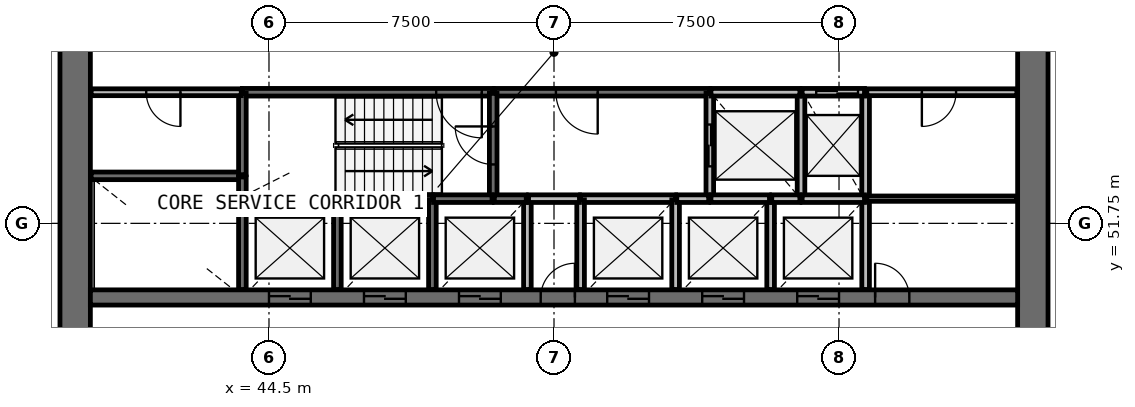
"""IFC4 building model, lengths in metres.
Left out: names, types, materials, properties, quantities, classifications, styles, units other than length and angle.
Written with IfcOpenShell. Run it as: python <this file> out.ifc"""

import sys

from ifc_helpers import new_model, si_unit, direction, frame, frame_2d, origin, place, context, subcontext, project, spatial, rectangle, extrude, source, transform, mapped, element, fill, save


model = new_model("IFC4")
c1 = context("Model", 3, precision=1e-05, world=origin(), true_north=direction((0.0, 1.0)))
c2 = subcontext(c1, "Body", "Model", "MODEL_VIEW")
j1 = project(units=[si_unit("LENGTHUNIT", "METRE"), si_unit("PLANEANGLEUNIT", "RADIAN")], contexts=[c1])
p1 = place(None, origin())
s1 = spatial("IfcSite", under=j1, at=p1, CompositionType="ELEMENT")
p2 = place(p1, origin())
s2 = spatial("IfcBuilding", under=s1, at=p2, CompositionType="ELEMENT")
p3 = place(p2, frame((0.0, 0.0, 133.1)))
s3 = spatial("IfcBuildingStorey", under=s2, at=p3, CompositionType="ELEMENT", Elevation=133.1)
p4 = place(p3, frame((64.6, 38.0, 0.0), z_axis=(0.0, 0.0, 1.0), x_axis=(0.0, 1.0, 0.0)))
e1 = element("IfcWall", 1, at=p4, inside=s3, PredefinedType="SHEAR", context=c2, shape_type="SweptSolid", body=[
    extrude(rectangle(XDim=20.0, YDim=0.8, at=frame_2d((10.0, 0.0))), origin(), (0.0, 0.0, 1.0), 3.9),
])
p5 = place(p4, frame((9.1, 0.0, 0.0)))
e2 = element("IfcOpeningElement", 2, at=p5, cuts=e1, PredefinedType="OPENING", context=c2, shape_type="SweptSolid", body=[
    extrude(rectangle(XDim=1.8, YDim=2.1, at=frame_2d((0.9, 1.05))), frame((0.0, 0.41, 0.0), z_axis=(0.0, -1.0, 0.0), x_axis=(1.0, 0.0, 0.0)), (0.0, 0.0, 1.0), 0.82),
])
p6 = place(p3, frame((39.4, 58.0, 0.0), z_axis=(0.0, 0.0, 1.0), x_axis=(0.0, -1.0, 0.0)))
e3 = element("IfcWall", 3, at=p6, inside=s3, PredefinedType="SHEAR", context=c2, shape_type="SweptSolid", body=[
    extrude(rectangle(XDim=20.0, YDim=0.8, at=frame_2d((10.0, 0.0))), origin(), (0.0, 0.0, 1.0), 3.9),
])
p7 = place(p6, frame((9.1, 0.0, 0.0)))
e4 = element("IfcOpeningElement", 4, at=p7, cuts=e3, PredefinedType="OPENING", context=c2, shape_type="SweptSolid", body=[
    extrude(rectangle(XDim=1.8, YDim=2.1, at=frame_2d((0.9, 1.05))), frame((0.0, 0.41, 0.0), z_axis=(0.0, -1.0, 0.0), x_axis=(1.0, 0.0, 0.0)), (0.0, 0.0, 1.0), 0.82),
])
p8 = place(p3, frame((39.8, 49.8, 0.0), z_axis=(0.0, 0.0, 1.0), x_axis=(1.0, 0.0, 0.0)))
e5 = element("IfcWall", 5, at=p8, inside=s3, PredefinedType="SHEAR", context=c2, shape_type="SweptSolid", body=[
    extrude(rectangle(XDim=24.4, YDim=0.4, at=frame_2d((12.2, 0.0))), origin(), (0.0, 0.0, 1.0), 3.9),
])
p9 = place(p8, frame((13.6, 0.0, 0.0)))
e6 = element("IfcOpeningElement", 6, at=p9, cuts=e5, PredefinedType="OPENING", context=c2, shape_type="SweptSolid", body=[
    extrude(rectangle(XDim=1.1, YDim=2.1, at=frame_2d((0.55, 1.05))), frame((0.0, 0.21, 0.0), z_axis=(0.0, -1.0, 0.0), x_axis=(1.0, 0.0, 0.0)), (0.0, 0.0, 1.0), 0.42),
])
p10 = place(p8, frame((16.1, 0.0, 0.0)))
e7 = element("IfcOpeningElement", 7, at=p10, cuts=e5, PredefinedType="OPENING", context=c2, shape_type="SweptSolid", body=[
    extrude(rectangle(XDim=1.1, YDim=2.1, at=frame_2d((0.55, 1.05))), frame((0.0, 0.21, 0.0), z_axis=(0.0, -1.0, 0.0), x_axis=(1.0, 0.0, 0.0)), (0.0, 0.0, 1.0), 0.42),
])
p11 = place(p8, frame((18.6, 0.0, 0.0)))
e8 = element("IfcOpeningElement", 8, at=p11, cuts=e5, PredefinedType="OPENING", context=c2, shape_type="SweptSolid", body=[
    extrude(rectangle(XDim=1.1, YDim=2.1, at=frame_2d((0.55, 1.05))), frame((0.0, 0.21, 0.0), z_axis=(0.0, -1.0, 0.0), x_axis=(1.0, 0.0, 0.0)), (0.0, 0.0, 1.0), 0.42),
])
p12 = place(p8, frame((4.7, 0.0, 0.0)))
e9 = element("IfcOpeningElement", 9, at=p12, cuts=e5, PredefinedType="OPENING", context=c2, shape_type="SweptSolid", body=[
    extrude(rectangle(XDim=1.1, YDim=2.1, at=frame_2d((0.55, 1.05))), frame((0.0, 0.21, 0.0), z_axis=(0.0, -1.0, 0.0), x_axis=(1.0, 0.0, 0.0)), (0.0, 0.0, 1.0), 0.42),
])
p13 = place(p8, frame((7.2, 0.0, 0.0)))
e10 = element("IfcOpeningElement", 10, at=p13, cuts=e5, PredefinedType="OPENING", context=c2, shape_type="SweptSolid", body=[
    extrude(rectangle(XDim=1.1, YDim=2.1, at=frame_2d((0.55, 1.05))), frame((0.0, 0.21, 0.0), z_axis=(0.0, -1.0, 0.0), x_axis=(1.0, 0.0, 0.0)), (0.0, 0.0, 1.0), 0.42),
])
p14 = place(p8, frame((9.7, 0.0, 0.0)))
e11 = element("IfcOpeningElement", 11, at=p14, cuts=e5, PredefinedType="OPENING", context=c2, shape_type="SweptSolid", body=[
    extrude(rectangle(XDim=1.1, YDim=2.1, at=frame_2d((0.55, 1.05))), frame((0.0, 0.21, 0.0), z_axis=(0.0, -1.0, 0.0), x_axis=(1.0, 0.0, 0.0)), (0.0, 0.0, 1.0), 0.42),
])
p15 = place(p8, frame((20.65, 0.0, 0.0)))
e12 = element("IfcOpeningElement", 12, at=p15, cuts=e5, PredefinedType="OPENING", context=c2, shape_type="SweptSolid", body=[
    extrude(rectangle(XDim=0.9, YDim=2.1, at=frame_2d((0.45, 1.05))), frame((0.0, 0.21, 0.0), z_axis=(0.0, -1.0, 0.0), x_axis=(1.0, 0.0, 0.0)), (0.0, 0.0, 1.0), 0.42),
])
p16 = place(p8, frame((11.85, 0.0, 0.0)))
e13 = element("IfcOpeningElement", 13, at=p16, cuts=e5, PredefinedType="OPENING", context=c2, shape_type="SweptSolid", body=[
    extrude(rectangle(XDim=0.9, YDim=2.1, at=frame_2d((0.45, 1.05))), frame((0.0, 0.21, 0.0), z_axis=(0.0, -1.0, 0.0), x_axis=(1.0, 0.0, 0.0)), (0.0, 0.0, 1.0), 0.42),
])
p17 = place(p3, frame((50.4, 55.2, 0.0), z_axis=(0.0, 0.0, 1.0), x_axis=(-1.0, 0.0, 0.0)))
e14 = element("IfcWall", 14, at=p17, inside=s3, PredefinedType="SOLIDWALL", context=c2, shape_type="SweptSolid", body=[
    extrude(rectangle(XDim=6.6, YDim=0.2, at=frame_2d((3.3, 0.0))), origin(), (0.0, 0.0, 1.0), 3.58),
])
p18 = place(p17, frame((0.3, 0.0, 0.0)))
e15 = element("IfcOpeningElement", 15, at=p18, cuts=e14, PredefinedType="OPENING", context=c2, shape_type="SweptSolid", body=[
    extrude(rectangle(XDim=1.2, YDim=2.1, at=frame_2d((0.6, 1.05))), frame((0.0, 0.11, 0.0), z_axis=(0.0, -1.0, 0.0), x_axis=(1.0, 0.0, 0.0)), (0.0, 0.0, 1.0), 0.22),
])
p19 = place(p3, frame((56.1, 55.2, 0.0), z_axis=(0.0, 0.0, 1.0), x_axis=(-1.0, 0.0, 0.0)))
e16 = element("IfcWall", 16, at=p19, inside=s3, PredefinedType="SOLIDWALL", context=c2, shape_type="SweptSolid", body=[
    extrude(rectangle(XDim=5.67, YDim=0.2, at=frame_2d((2.835, 0.0))), origin(), (0.0, 0.0, 1.0), 3.58),
])
p20 = place(p19, frame((2.95, 0.0, 0.0)))
e17 = element("IfcOpeningElement", 17, at=p20, cuts=e16, PredefinedType="OPENING", context=c2, shape_type="SweptSolid", body=[
    extrude(rectangle(XDim=1.1, YDim=2.1, at=frame_2d((0.55, 1.05))), frame((0.0, 0.11, 0.0), z_axis=(0.0, -1.0, 0.0), x_axis=(1.0, 0.0, 0.0)), (0.0, 0.0, 1.0), 0.22),
])
p21 = place(p3, frame((43.8, 53.0, 0.0), z_axis=(0.0, 0.0, 1.0), x_axis=(-1.0, 0.0, 0.0)))
e18 = element("IfcWall", 18, at=p21, inside=s3, PredefinedType="SOLIDWALL", context=c2, shape_type="SweptSolid", body=[
    extrude(rectangle(XDim=3.98, YDim=0.2, at=frame_2d((1.99, 0.0))), origin(), (0.0, 0.0, 1.0), 3.58),
])
p22 = place(p3, frame((50.4, 52.4, 0.0), z_axis=(0.0, 0.0, 1.0), x_axis=(0.0, 1.0, 0.0)))
e19 = element("IfcWall", 19, at=p22, inside=s3, PredefinedType="SOLIDWALL", context=c2, shape_type="SweptSolid", body=[
    extrude(rectangle(XDim=2.77, YDim=0.2, at=frame_2d((1.385, 0.0))), origin(), (0.0, 0.0, 1.0), 3.58),
])
p23 = place(p22, frame((0.9, 0.0, 0.0)))
e20 = element("IfcOpeningElement", 20, at=p23, cuts=e19, PredefinedType="OPENING", context=c2, shape_type="SweptSolid", body=[
    extrude(rectangle(XDim=1.0, YDim=2.1, at=frame_2d((0.5, 1.05))), frame((0.0, 0.11, 0.0), z_axis=(0.0, -1.0, 0.0), x_axis=(1.0, 0.0, 0.0)), (0.0, 0.0, 1.0), 0.22),
])
p24 = place(p3, frame((56.1, 55.17, 0.0), z_axis=(0.0, 0.0, 1.0), x_axis=(0.0, -1.0, 0.0)))
e21 = element("IfcWall", 21, at=p24, inside=s3, PredefinedType="SOLIDWALL", context=c2, shape_type="SweptSolid", body=[
    extrude(rectangle(XDim=2.77, YDim=0.2, at=frame_2d((1.385, 0.0))), origin(), (0.0, 0.0, 1.0), 3.58),
])
p25 = place(p24, frame((0.82, 0.0, 0.0)))
e22 = element("IfcOpeningElement", 22, at=p25, cuts=e21, PredefinedType="OPENING", context=c2, shape_type="SweptSolid", body=[
    extrude(rectangle(XDim=1.1, YDim=2.1, at=frame_2d((0.55, 1.05))), frame((0.0, 0.11, 0.0), z_axis=(0.0, -1.0, 0.0), x_axis=(1.0, 0.0, 0.0)), (0.0, 0.0, 1.0), 0.22),
])
for number, where, z_axis, x_axis in (
    (23, (58.5, 52.4, 0.0), (0.0, 0.0, 1.0), (0.0, 1.0, 0.0)),
    (24, (60.2, 52.4, 0.0), (0.0, 0.0, 1.0), (0.0, 1.0, 0.0)),
):
    element("IfcWall", number, at=place(p3, frame(where, z_axis=z_axis, x_axis=x_axis)), inside=s3, PredefinedType="SOLIDWALL", context=c2, shape_type="SweptSolid", body=[
        extrude(rectangle(XDim=2.8, YDim=0.2, at=frame_2d((1.4, 0.0))), origin(), (0.0, 0.0, 1.0), 3.58),
    ])
p26 = place(p3, frame((46.3, 52.4, 0.0), z_axis=(0.0, 0.0, 1.0), x_axis=(-1.0, 0.0, 0.0)))
e25 = element("IfcWall", 25, at=p26, inside=s3, PredefinedType="SOLIDWALL", context=c2, shape_type="SweptSolid", body=[
    extrude(rectangle(XDim=2.5, YDim=0.2, at=frame_2d((1.25, 0.0))), origin(), (0.0, 0.0, 1.0), 3.58),
])
p27 = place(p3, frame((48.8, 52.4, 0.0), z_axis=(0.0, 0.0, 1.0), x_axis=(-1.0, 0.0, 0.0)))
e26 = element("IfcWall", 26, at=p27, inside=s3, PredefinedType="SOLIDWALL", context=c2, shape_type="SweptSolid", body=[
    extrude(rectangle(XDim=2.47, YDim=0.2, at=frame_2d((1.235, 0.0))), origin(), (0.0, 0.0, 1.0), 3.58),
])
p28 = place(p3, frame((55.2, 52.4, 0.0), z_axis=(0.0, 0.0, 1.0), x_axis=(-1.0, 0.0, 0.0)))
e27 = element("IfcWall", 27, at=p28, inside=s3, PredefinedType="SOLIDWALL", context=c2, shape_type="SweptSolid", body=[
    extrude(rectangle(XDim=2.5, YDim=0.2, at=frame_2d((1.25, 0.0))), origin(), (0.0, 0.0, 1.0), 3.58),
])
p29 = place(p3, frame((58.47, 55.2, 0.0), z_axis=(0.0, 0.0, 1.0), x_axis=(-1.0, 0.0, 0.0)))
e28 = element("IfcWall", 28, at=p29, inside=s3, PredefinedType="SOLIDWALL", context=c2, shape_type="SweptSolid", body=[
    extrude(rectangle(XDim=2.34, YDim=0.2, at=frame_2d((1.17, 0.0))), origin(), (0.0, 0.0, 1.0), 3.58),
])
for number, where, z_axis, x_axis in (
    (29, (43.8, 52.37, 0.0), (0.0, 0.0, 1.0), (0.0, -1.0, 0.0)),
    (30, (46.3, 50.01, 0.0), (0.0, 0.0, 1.0), (0.0, 1.0, 0.0)),
    (31, (48.8, 50.01, 0.0), (0.0, 0.0, 1.0), (0.0, 1.0, 0.0)),
):
    element("IfcWall", number, at=place(p3, frame(where, z_axis=z_axis, x_axis=x_axis)), inside=s3, PredefinedType="SOLIDWALL", context=c2, shape_type="SweptSolid", body=[
        extrude(rectangle(XDim=2.36, YDim=0.2, at=frame_2d((1.18, 0.0))), origin(), (0.0, 0.0, 1.0), 3.58),
    ])
p30 = place(p3, frame((51.3, 50.01, 0.0), z_axis=(0.0, 0.0, 1.0), x_axis=(0.0, 1.0, 0.0)))
e32 = element("IfcWall", 32, at=p30, inside=s3, PredefinedType="SOLIDWALL", context=c2, shape_type="SweptSolid", body=[
    extrude(rectangle(XDim=2.39, YDim=0.2, at=frame_2d((1.195, 0.0))), origin(), (0.0, 0.0, 1.0), 3.58),
])
for number, where, z_axis, x_axis in (
    (33, (52.7, 52.37, 0.0), (0.0, 0.0, 1.0), (0.0, -1.0, 0.0)),
    (34, (55.2, 50.01, 0.0), (0.0, 0.0, 1.0), (0.0, 1.0, 0.0)),
):
    element("IfcWall", number, at=place(p3, frame(where, z_axis=z_axis, x_axis=x_axis)), inside=s3, PredefinedType="SOLIDWALL", context=c2, shape_type="SweptSolid", body=[
        extrude(rectangle(XDim=2.36, YDim=0.2, at=frame_2d((1.18, 0.0))), origin(), (0.0, 0.0, 1.0), 3.58),
    ])
p31 = place(p3, frame((57.7, 50.01, 0.0), z_axis=(0.0, 0.0, 1.0), x_axis=(0.0, 1.0, 0.0)))
e35 = element("IfcWall", 35, at=p31, inside=s3, PredefinedType="SOLIDWALL", context=c2, shape_type="SweptSolid", body=[
    extrude(rectangle(XDim=2.39, YDim=0.2, at=frame_2d((1.195, 0.0))), origin(), (0.0, 0.0, 1.0), 3.58),
])
p32 = place(p3, frame((60.2, 50.01, 0.0), z_axis=(0.0, 0.0, 1.0), x_axis=(0.0, 1.0, 0.0)))
e36 = element("IfcWall", 36, at=p32, inside=s3, PredefinedType="SOLIDWALL", context=c2, shape_type="SweptSolid", body=[
    extrude(rectangle(XDim=2.36, YDim=0.2, at=frame_2d((1.18, 0.0))), origin(), (0.0, 0.0, 1.0), 3.58),
])
p33 = place(p3, frame((43.8, 55.17, 0.0), z_axis=(0.0, 0.0, 1.0), x_axis=(0.0, -1.0, 0.0)))
e37 = element("IfcWall", 37, at=p33, inside=s3, PredefinedType="SOLIDWALL", context=c2, shape_type="SweptSolid", body=[
    extrude(rectangle(XDim=2.14, YDim=0.2, at=frame_2d((1.07, 0.0))), origin(), (0.0, 0.0, 1.0), 3.58),
])
p34 = place(p3, frame((60.17, 52.4, 0.0), z_axis=(0.0, 0.0, 1.0), x_axis=(-1.0, 0.0, 0.0)))
e38 = element("IfcWall", 38, at=p34, inside=s3, PredefinedType="SOLIDWALL", context=c2, shape_type="SweptSolid", body=[
    extrude(rectangle(XDim=1.64, YDim=0.2, at=frame_2d((0.82, 0.0))), origin(), (0.0, 0.0, 1.0), 3.58),
])
p35 = place(p3, frame((60.17, 55.2, 0.0), z_axis=(0.0, 0.0, 1.0), x_axis=(-1.0, 0.0, 0.0)))
e39 = element("IfcWall", 39, at=p35, inside=s3, PredefinedType="SOLIDWALL", context=c2, shape_type="SweptSolid", body=[
    extrude(rectangle(XDim=1.64, YDim=0.2, at=frame_2d((0.82, 0.0))), origin(), (0.0, 0.0, 1.0), 3.58),
])
p36 = place(p35, frame((0.17, 0.0, 0.0)))
e40 = element("IfcOpeningElement", 40, at=p36, cuts=e39, PredefinedType="OPENING", context=c2, shape_type="SweptSolid", body=[
    extrude(rectangle(XDim=1.1, YDim=2.1, at=frame_2d((0.55, 1.05))), frame((0.0, 0.11, 0.0), z_axis=(0.0, -1.0, 0.0), x_axis=(1.0, 0.0, 0.0)), (0.0, 0.0, 1.0), 0.22),
])
for number, where, z_axis, x_axis in (
    (41, (50.37, 52.4, 0.0), (0.0, 0.0, 1.0), (-1.0, 0.0, 0.0)),
    (42, (57.67, 52.4, 0.0), (0.0, 0.0, 1.0), (-1.0, 0.0, 0.0)),
):
    element("IfcWall", number, at=place(p3, frame(where, z_axis=z_axis, x_axis=x_axis)), inside=s3, PredefinedType="SOLIDWALL", context=c2, shape_type="SweptSolid", body=[
        extrude(rectangle(XDim=1.54, YDim=0.2, at=frame_2d((0.77, 0.0))), origin(), (0.0, 0.0, 1.0), 3.58),
    ])
p37 = place(p3, frame((51.33, 52.4, 0.0), z_axis=(0.0, 0.0, 1.0), x_axis=(1.0, 0.0, 0.0)))
e43 = element("IfcWall", 43, at=p37, inside=s3, PredefinedType="SOLIDWALL", context=c2, shape_type="SweptSolid", body=[
    extrude(rectangle(XDim=1.34, YDim=0.2, at=frame_2d((0.67, 0.0))), origin(), (0.0, 0.0, 1.0), 3.58),
])
for number, where, z_axis, x_axis in (
    (44, (51.27, 52.4, 0.0), (0.0, 0.0, 1.0), (-1.0, 0.0, 0.0)),
    (45, (56.07, 52.4, 0.0), (0.0, 0.0, 1.0), (-1.0, 0.0, 0.0)),
):
    element("IfcWall", number, at=place(p3, frame(where, z_axis=z_axis, x_axis=x_axis)), inside=s3, PredefinedType="SOLIDWALL", context=c2, shape_type="SweptSolid", body=[
        extrude(rectangle(XDim=0.84, YDim=0.2, at=frame_2d((0.42, 0.0))), origin(), (0.0, 0.0, 1.0), 3.58),
    ])
p38 = place(p3, frame((58.47, 52.4, 0.0), z_axis=(0.0, 0.0, 1.0), x_axis=(-1.0, 0.0, 0.0)))
e46 = element("IfcWall", 46, at=p38, inside=s3, PredefinedType="SOLIDWALL", context=c2, shape_type="SweptSolid", body=[
    extrude(rectangle(XDim=0.74, YDim=0.2, at=frame_2d((0.37, 0.0))), origin(), (0.0, 0.0, 1.0), 3.58),
])
p39 = place(p3, frame((43.8, 52.43, 0.0), z_axis=(0.0, 0.0, 1.0), x_axis=(0.0, 1.0, 0.0)))
e47 = element("IfcWall", 47, at=p39, inside=s3, PredefinedType="SOLIDWALL", context=c2, shape_type="SweptSolid", body=[
    extrude(rectangle(XDim=0.54, YDim=0.2, at=frame_2d((0.27, 0.0))), origin(), (0.0, 0.0, 1.0), 3.58),
])
p40 = place(p3, frame((64.18, 55.2, 0.0), z_axis=(0.0, 0.0, 1.0), x_axis=(-1.0, 0.0, 0.0)))
e48 = element("IfcWall", 48, at=p40, inside=s3, PredefinedType="PARTITIONING", context=c2, shape_type="SweptSolid", body=[
    extrude(rectangle(XDim=3.95, YDim=0.18, at=frame_2d((1.975, 0.0))), origin(), (0.0, 0.0, 1.0), 3.58),
])
p41 = place(p40, frame((1.6, 0.0, 0.0)))
e49 = element("IfcOpeningElement", 49, at=p41, cuts=e48, PredefinedType="OPENING", context=c2, shape_type="SweptSolid", body=[
    extrude(rectangle(XDim=0.9, YDim=2.1, at=frame_2d((0.45, 1.05))), frame((0.0, 0.1, 0.0), z_axis=(0.0, -1.0, 0.0), x_axis=(1.0, 0.0, 0.0)), (0.0, 0.0, 1.0), 0.2),
])
p42 = place(p3, frame((43.77, 55.2, 0.0), z_axis=(0.0, 0.0, 1.0), x_axis=(-1.0, 0.0, 0.0)))
e50 = element("IfcWall", 50, at=p42, inside=s3, PredefinedType="PARTITIONING", context=c2, shape_type="SweptSolid", body=[
    extrude(rectangle(XDim=3.95, YDim=0.18, at=frame_2d((1.975, 0.0))), origin(), (0.0, 0.0, 1.0), 3.58),
])
p43 = place(p42, frame((1.6, 0.0, 0.0)))
e51 = element("IfcOpeningElement", 51, at=p43, cuts=e50, PredefinedType="OPENING", context=c2, shape_type="SweptSolid", body=[
    extrude(rectangle(XDim=0.9, YDim=2.1, at=frame_2d((0.45, 1.05))), frame((0.0, 0.1, 0.0), z_axis=(0.0, -1.0, 0.0), x_axis=(1.0, 0.0, 0.0)), (0.0, 0.0, 1.0), 0.2),
])
p44 = place(p3, frame((64.18, 52.4, 0.0), z_axis=(0.0, 0.0, 1.0), x_axis=(-1.0, 0.0, 0.0)))
e52 = element("IfcWall", 52, at=p44, inside=s3, PredefinedType="PARTITIONING", context=c2, shape_type="SweptSolid", body=[
    extrude(rectangle(XDim=3.95, YDim=0.14, at=frame_2d((1.975, 0.0))), origin(), (0.0, 0.0, 1.0), 2.88),
])
m1 = source(origin(), c2, "Body", "SweptSolid", [
    extrude(rectangle(XDim=1.1, YDim=2.1, at=frame_2d((0.55, 1.05))), frame((0.0, 0.025, 0.0), z_axis=(0.0, -1.0, 0.0), x_axis=(1.0, 0.0, 0.0)), (0.0, 0.0, 1.0), 0.05),
])
p45 = place(p9, origin())
e53 = element("IfcDoor", 53, at=p45, inside=s3, OperationType="DOUBLE_DOOR_SLIDING", PredefinedType="USERDEFINED", context=c2, shape_type="MappedRepresentation", body=[
    mapped(m1, transform((0.0, 0.0, 0.0), scale=1.0)),
])
fill(e6, e53)
p46 = place(p10, origin())
e54 = element("IfcDoor", 54, at=p46, inside=s3, OperationType="DOUBLE_DOOR_SLIDING", PredefinedType="USERDEFINED", context=c2, shape_type="MappedRepresentation", body=[
    mapped(m1, transform((0.0, 0.0, 0.0), scale=1.0)),
])
fill(e7, e54)
p47 = place(p11, origin())
e55 = element("IfcDoor", 55, at=p47, inside=s3, OperationType="DOUBLE_DOOR_SLIDING", PredefinedType="USERDEFINED", context=c2, shape_type="MappedRepresentation", body=[
    mapped(m1, transform((0.0, 0.0, 0.0), scale=1.0)),
])
fill(e8, e55)
p48 = place(p12, origin())
e56 = element("IfcDoor", 56, at=p48, inside=s3, OperationType="DOUBLE_DOOR_SLIDING", PredefinedType="USERDEFINED", context=c2, shape_type="MappedRepresentation", body=[
    mapped(m1, transform((0.0, 0.0, 0.0), scale=1.0)),
])
fill(e9, e56)
p49 = place(p13, origin())
e57 = element("IfcDoor", 57, at=p49, inside=s3, OperationType="DOUBLE_DOOR_SLIDING", PredefinedType="USERDEFINED", context=c2, shape_type="MappedRepresentation", body=[
    mapped(m1, transform((0.0, 0.0, 0.0), scale=1.0)),
])
fill(e10, e57)
p50 = place(p14, origin())
e58 = element("IfcDoor", 58, at=p50, inside=s3, OperationType="DOUBLE_DOOR_SLIDING", PredefinedType="USERDEFINED", context=c2, shape_type="MappedRepresentation", body=[
    mapped(m1, transform((0.0, 0.0, 0.0), scale=1.0)),
])
fill(e11, e58)
p51 = place(p25, origin())
e59 = element("IfcDoor", 59, at=p51, inside=s3, OperationType="DOUBLE_DOOR_SLIDING", PredefinedType="USERDEFINED", context=c2, shape_type="MappedRepresentation", body=[
    mapped(m1, transform((0.0, 0.0, 0.0), scale=1.0)),
])
fill(e22, e59)
p52 = place(p36, origin())
e60 = element("IfcDoor", 60, at=p52, inside=s3, OperationType="DOUBLE_DOOR_SLIDING", PredefinedType="USERDEFINED", context=c2, shape_type="MappedRepresentation", body=[
    mapped(m1, transform((0.0, 0.0, 0.0), scale=1.0)),
])
fill(e40, e60)
m2 = source(origin(), c2, "Body", "SweptSolid", [
    extrude(rectangle(XDim=1.2, YDim=2.1, at=frame_2d((0.6, 1.05))), frame((0.0, 0.025, 0.0), z_axis=(0.0, -1.0, 0.0), x_axis=(1.0, 0.0, 0.0)), (0.0, 0.0, 1.0), 0.05),
])
p53 = place(p18, origin())
e61 = element("IfcDoor", 61, at=p53, inside=s3, OperationType="SINGLE_SWING_LEFT", PredefinedType="DOOR", context=c2, shape_type="MappedRepresentation", body=[
    mapped(m2, transform((0.0, 0.0, 0.0), scale=1.0)),
])
fill(e15, e61)
m3 = source(origin(), c2, "Body", "SweptSolid", [
    extrude(rectangle(XDim=1.0, YDim=2.1, at=frame_2d((0.5, 1.05))), frame((0.0, 0.025, 0.0), z_axis=(0.0, -1.0, 0.0), x_axis=(1.0, 0.0, 0.0)), (0.0, 0.0, 1.0), 0.05),
])
p54 = place(p23, origin())
e62 = element("IfcDoor", 62, at=p54, inside=s3, OperationType="SINGLE_SWING_RIGHT", PredefinedType="DOOR", context=c2, shape_type="MappedRepresentation", body=[
    mapped(m3, transform((0.0, 0.0, 0.0), scale=1.0)),
])
fill(e20, e62)
m4 = source(origin(), c2, "Body", "SweptSolid", [
    extrude(rectangle(XDim=1.1, YDim=2.1, at=frame_2d((0.55, 1.05))), frame((0.0, 0.025, 0.0), z_axis=(0.0, -1.0, 0.0), x_axis=(1.0, 0.0, 0.0)), (0.0, 0.0, 1.0), 0.05),
])
p55 = place(p20, origin())
e63 = element("IfcDoor", 63, at=p55, inside=s3, OperationType="SINGLE_SWING_LEFT", PredefinedType="DOOR", context=c2, shape_type="MappedRepresentation", body=[
    mapped(m4, transform((0.0, 0.0, 0.0), scale=1.0)),
])
fill(e17, e63)
m5 = source(origin(), c2, "Body", "SweptSolid", [
    extrude(rectangle(XDim=0.9, YDim=2.1, at=frame_2d((0.45, 1.05))), frame((0.0, 0.025, 0.0), z_axis=(0.0, -1.0, 0.0), x_axis=(1.0, 0.0, 0.0)), (0.0, 0.0, 1.0), 0.05),
])
p56 = place(p43, origin())
e64 = element("IfcDoor", 64, at=p56, inside=s3, OperationType="SINGLE_SWING_LEFT", PredefinedType="DOOR", context=c2, shape_type="MappedRepresentation", body=[
    mapped(m5, transform((0.0, 0.0, 0.0), scale=1.0)),
])
fill(e51, e64)
p57 = place(p15, origin())
e65 = element("IfcDoor", 65, at=p57, inside=s3, OperationType="SINGLE_SWING_LEFT", PredefinedType="DOOR", context=c2, shape_type="MappedRepresentation", body=[
    mapped(m5, transform((0.0, 0.0, 0.0), scale=1.0)),
])
fill(e12, e65)
p58 = place(p41, origin())
e66 = element("IfcDoor", 66, at=p58, inside=s3, OperationType="SINGLE_SWING_RIGHT", PredefinedType="DOOR", context=c2, shape_type="MappedRepresentation", body=[
    mapped(m5, transform((0.0, 0.0, 0.0), scale=1.0)),
])
fill(e49, e66)
p59 = place(p16, origin())
e67 = element("IfcDoor", 67, at=p59, inside=s3, OperationType="SINGLE_SWING_RIGHT", PredefinedType="DOOR", context=c2, shape_type="MappedRepresentation", body=[
    mapped(m5, transform((0.0, 0.0, 0.0), scale=1.0)),
])
fill(e13, e67)
save(model, sys.argv[1])
